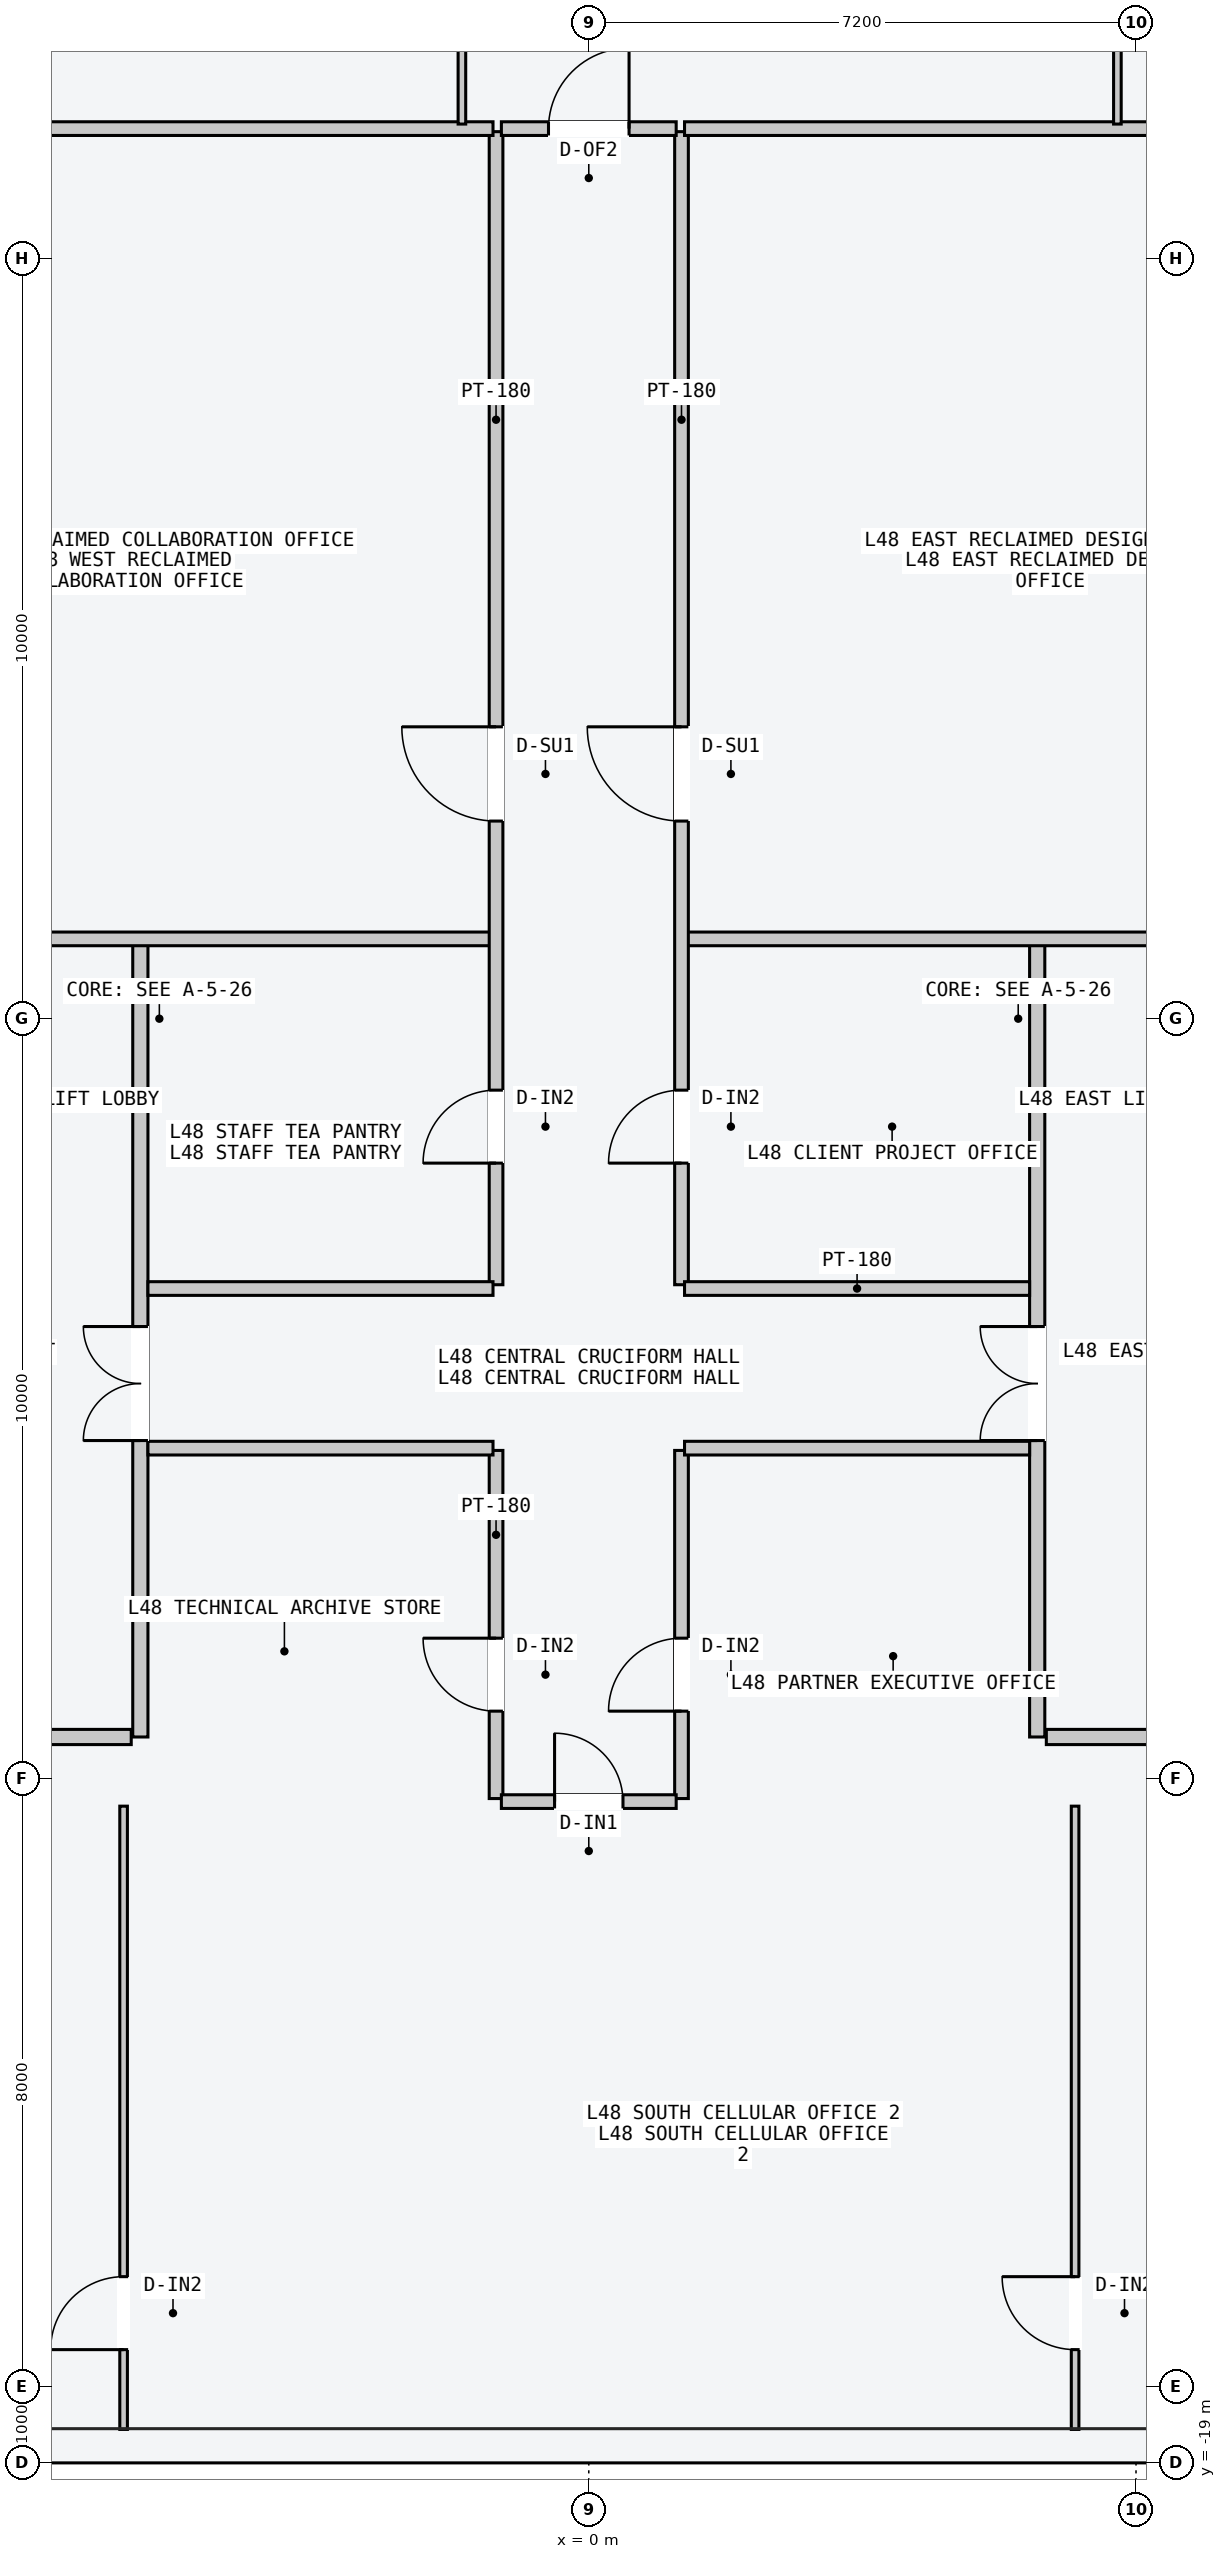
"""IFC4 building model, lengths in metres.
Left out: names, types, materials, properties, quantities, classifications, styles, units other than length and angle.
Written with IfcOpenShell. Run it as: python <this file> out.ifc"""

import sys

from ifc_helpers import new_model, si_unit, direction, frame, frame_2d, origin, place, context, subcontext, project, spatial, rectangle, extrude, element, fill, save


model = new_model("IFC4")
c1 = context("Model", 3, precision=1e-05, world=origin(), true_north=direction((0.0, 1.0)))
c2 = subcontext(c1, "Body", "Model", "MODEL_VIEW")
j1 = project(units=[si_unit("LENGTHUNIT", "METRE"), si_unit("PLANEANGLEUNIT", "RADIAN")], contexts=[c1])
p1 = place(None, origin())
s1 = spatial("IfcSite", under=j1, at=p1, CompositionType="ELEMENT")
p2 = place(p1, origin())
s2 = spatial("IfcBuilding", under=s1, at=p2, CompositionType="ELEMENT")
p3 = place(p2, frame((0.0, 0.0, 183.9)))
s3 = spatial("IfcBuildingStorey", under=s2, at=p3, CompositionType="ELEMENT", Elevation=183.9)
p4 = place(p3, frame((-5.9, -9.45, 0.0), z_axis=(0.0, 0.0, 1.0), x_axis=(0.0, 1.0, 0.0)))
e1 = element("IfcWall", 1, at=p4, inside=s3, PredefinedType="PARTITIONING", context=c2, shape_type="SweptSolid", body=[
    extrude(rectangle(XDim=10.5, YDim=0.2, at=frame_2d((5.25, 0.0))), origin(), (0.0, 0.0, 1.0), 3.4),
])
p5 = place(p4, frame((3.9, 0.0, 0.0)))
e2 = element("IfcOpeningElement", 2, at=p5, cuts=e1, PredefinedType="OPENING", context=c2, shape_type="SweptSolid", body=[
    extrude(rectangle(XDim=1.5, YDim=2.2, at=frame_2d((0.75, 1.1))), frame((0.0, 0.11, 0.0), z_axis=(0.0, -1.0, 0.0), x_axis=(1.0, 0.0, 0.0)), (0.0, 0.0, 1.0), 0.22),
])
p6 = place(p3, frame((-6.02, -9.45, 0.0), z_axis=(0.0, 0.0, 1.0), x_axis=(-1.0, 0.0, 0.0)))
e3 = element("IfcWall", 3, at=p6, inside=s3, PredefinedType="PARTITIONING", context=c2, shape_type="SweptSolid", body=[
    extrude(rectangle(XDim=1.8, YDim=0.2, at=frame_2d((0.9, 0.0))), origin(), (0.0, 0.0, 1.0), 3.4),
])
p7 = place(p3, frame((5.9, -9.45, 0.0), z_axis=(0.0, 0.0, 1.0), x_axis=(0.0, 1.0, 0.0)))
e4 = element("IfcWall", 4, at=p7, inside=s3, PredefinedType="PARTITIONING", context=c2, shape_type="SweptSolid", body=[
    extrude(rectangle(XDim=10.5, YDim=0.2, at=frame_2d((5.25, 0.0))), origin(), (0.0, 0.0, 1.0), 3.4),
])
p8 = place(p7, frame((3.9, 0.0, 0.0)))
e5 = element("IfcOpeningElement", 5, at=p8, cuts=e4, PredefinedType="OPENING", context=c2, shape_type="SweptSolid", body=[
    extrude(rectangle(XDim=1.5, YDim=2.2, at=frame_2d((0.75, 1.1))), frame((0.0, 0.11, 0.0), z_axis=(0.0, -1.0, 0.0), x_axis=(1.0, 0.0, 0.0)), (0.0, 0.0, 1.0), 0.22),
])
p9 = place(p3, frame((6.02, -9.45, 0.0), z_axis=(0.0, 0.0, 1.0), x_axis=(1.0, 0.0, 0.0)))
e6 = element("IfcWall", 6, at=p9, inside=s3, PredefinedType="PARTITIONING", context=c2, shape_type="SweptSolid", body=[
    extrude(rectangle(XDim=1.8, YDim=0.2, at=frame_2d((0.9, 0.0))), origin(), (0.0, 0.0, 1.0), 3.4),
])
p10 = place(p3, frame((-10.05, 1.05, 0.0), z_axis=(0.0, 0.0, 1.0), x_axis=(1.0, 0.0, 0.0)))
e7 = element("IfcWall", 7, at=p10, inside=s3, PredefinedType="PARTITIONING", context=c2, shape_type="SweptSolid", body=[
    extrude(rectangle(XDim=8.79, YDim=0.18, at=frame_2d((4.395, 0.0))), origin(), (0.0, 0.0, 1.0), 3.4),
])
p11 = place(p3, frame((-1.22, -3.5, 0.0), z_axis=(0.0, 0.0, 1.0), x_axis=(0.0, 1.0, 0.0)))
e8 = element("IfcWall", 8, at=p11, inside=s3, PredefinedType="PARTITIONING", context=c2, shape_type="SweptSolid", body=[
    extrude(rectangle(XDim=15.17, YDim=0.18, at=frame_2d((7.585, 0.0))), origin(), (0.0, 0.0, 1.0), 3.4),
])
p12 = place(p11, frame((6.1, 0.0, 0.0)))
e9 = element("IfcOpeningElement", 9, at=p12, cuts=e8, PredefinedType="OPENING", context=c2, shape_type="SweptSolid", body=[
    extrude(rectangle(XDim=1.24, YDim=2.24, at=frame_2d((0.62, 1.12))), frame((0.0, 0.1, 0.0), z_axis=(0.0, -1.0, 0.0), x_axis=(1.0, 0.0, 0.0)), (0.0, 0.0, 1.0), 0.2),
])
p13 = place(p11, frame((1.6, 0.0, 0.0)))
e10 = element("IfcOpeningElement", 10, at=p13, cuts=e8, PredefinedType="OPENING", context=c2, shape_type="SweptSolid", body=[
    extrude(rectangle(XDim=0.96, YDim=2.18, at=frame_2d((0.48, 1.09))), frame((0.0, 0.1, 0.0), z_axis=(0.0, -1.0, 0.0), x_axis=(1.0, 0.0, 0.0)), (0.0, 0.0, 1.0), 0.2),
])
p14 = place(p3, frame((-7.5, 11.71, 0.0), z_axis=(0.0, 0.0, 1.0), x_axis=(1.0, 0.0, 0.0)))
e11 = element("IfcWall", 11, at=p14, inside=s3, PredefinedType="PARTITIONING", context=c2, shape_type="SweptSolid", body=[
    extrude(rectangle(XDim=6.24, YDim=0.18, at=frame_2d((3.12, 0.0))), origin(), (0.0, 0.0, 1.0), 3.4),
])
p15 = place(p3, frame((-5.8, -3.55, 0.0), z_axis=(0.0, 0.0, 1.0), x_axis=(1.0, 0.0, 0.0)))
e12 = element("IfcWall", 12, at=p15, inside=s3, PredefinedType="PARTITIONING", context=c2, shape_type="SweptSolid", body=[
    extrude(rectangle(XDim=4.54, YDim=0.18, at=frame_2d((2.27, 0.0))), origin(), (0.0, 0.0, 1.0), 3.4),
])
p16 = place(p3, frame((1.26, 1.05, 0.0), z_axis=(0.0, 0.0, 1.0), x_axis=(1.0, 0.0, 0.0)))
e13 = element("IfcWall", 13, at=p16, inside=s3, PredefinedType="PARTITIONING", context=c2, shape_type="SweptSolid", body=[
    extrude(rectangle(XDim=8.8, YDim=0.18, at=frame_2d((4.4, 0.0))), origin(), (0.0, 0.0, 1.0), 3.4),
])
p17 = place(p3, frame((1.22, -3.5, 0.0), z_axis=(0.0, 0.0, 1.0), x_axis=(0.0, 1.0, 0.0)))
e14 = element("IfcWall", 14, at=p17, inside=s3, PredefinedType="PARTITIONING", context=c2, shape_type="SweptSolid", body=[
    extrude(rectangle(XDim=15.17, YDim=0.18, at=frame_2d((7.585, 0.0))), origin(), (0.0, 0.0, 1.0), 3.4),
])
p18 = place(p17, frame((6.1, 0.0, 0.0)))
e15 = element("IfcOpeningElement", 15, at=p18, cuts=e14, PredefinedType="OPENING", context=c2, shape_type="SweptSolid", body=[
    extrude(rectangle(XDim=1.24, YDim=2.24, at=frame_2d((0.62, 1.12))), frame((0.0, 0.1, 0.0), z_axis=(0.0, -1.0, 0.0), x_axis=(1.0, 0.0, 0.0)), (0.0, 0.0, 1.0), 0.2),
])
p19 = place(p17, frame((1.6, 0.0, 0.0)))
e16 = element("IfcOpeningElement", 16, at=p19, cuts=e14, PredefinedType="OPENING", context=c2, shape_type="SweptSolid", body=[
    extrude(rectangle(XDim=0.96, YDim=2.18, at=frame_2d((0.48, 1.09))), frame((0.0, 0.1, 0.0), z_axis=(0.0, -1.0, 0.0), x_axis=(1.0, 0.0, 0.0)), (0.0, 0.0, 1.0), 0.2),
])
p20 = place(p3, frame((1.26, 11.71, 0.0), z_axis=(0.0, 0.0, 1.0), x_axis=(1.0, 0.0, 0.0)))
e17 = element("IfcWall", 17, at=p20, inside=s3, PredefinedType="PARTITIONING", context=c2, shape_type="SweptSolid", body=[
    extrude(rectangle(XDim=6.24, YDim=0.18, at=frame_2d((3.12, 0.0))), origin(), (0.0, 0.0, 1.0), 3.4),
])
p21 = place(p3, frame((1.26, -3.55, 0.0), z_axis=(0.0, 0.0, 1.0), x_axis=(1.0, 0.0, 0.0)))
e18 = element("IfcWall", 18, at=p21, inside=s3, PredefinedType="PARTITIONING", context=c2, shape_type="SweptSolid", body=[
    extrude(rectangle(XDim=4.54, YDim=0.18, at=frame_2d((2.27, 0.0))), origin(), (0.0, 0.0, 1.0), 3.4),
])
p22 = place(p3, frame((-1.22, -10.26, 0.0), z_axis=(0.0, 0.0, 1.0), x_axis=(0.0, 1.0, 0.0)))
e19 = element("IfcWall", 19, at=p22, inside=s3, PredefinedType="PARTITIONING", context=c2, shape_type="SweptSolid", body=[
    extrude(rectangle(XDim=4.58, YDim=0.18, at=frame_2d((2.29, 0.0))), origin(), (0.0, 0.0, 1.0), 3.4),
])
p23 = place(p22, frame((1.15, 0.0, 0.0)))
e20 = element("IfcOpeningElement", 20, at=p23, cuts=e19, PredefinedType="OPENING", context=c2, shape_type="SweptSolid", body=[
    extrude(rectangle(XDim=0.96, YDim=2.18, at=frame_2d((0.48, 1.09))), frame((0.0, 0.1, 0.0), z_axis=(0.0, -1.0, 0.0), x_axis=(1.0, 0.0, 0.0)), (0.0, 0.0, 1.0), 0.2),
])
p24 = place(p3, frame((1.22, -10.26, 0.0), z_axis=(0.0, 0.0, 1.0), x_axis=(0.0, 1.0, 0.0)))
e21 = element("IfcWall", 21, at=p24, inside=s3, PredefinedType="PARTITIONING", context=c2, shape_type="SweptSolid", body=[
    extrude(rectangle(XDim=4.58, YDim=0.18, at=frame_2d((2.29, 0.0))), origin(), (0.0, 0.0, 1.0), 3.4),
])
p25 = place(p24, frame((1.15, 0.0, 0.0)))
e22 = element("IfcOpeningElement", 22, at=p25, cuts=e21, PredefinedType="OPENING", context=c2, shape_type="SweptSolid", body=[
    extrude(rectangle(XDim=0.96, YDim=2.18, at=frame_2d((0.48, 1.09))), frame((0.0, 0.1, 0.0), z_axis=(0.0, -1.0, 0.0), x_axis=(1.0, 0.0, 0.0)), (0.0, 0.0, 1.0), 0.2),
])
for number, where, z_axis, x_axis in (
    (23, (-5.8, -5.65, 0.0), (0.0, 0.0, 1.0), (1.0, 0.0, 0.0)),
    (24, (1.26, -5.65, 0.0), (0.0, 0.0, 1.0), (1.0, 0.0, 0.0)),
):
    element("IfcWall", number, at=place(p3, frame(where, z_axis=z_axis, x_axis=x_axis)), inside=s3, PredefinedType="PARTITIONING", context=c2, shape_type="SweptSolid", body=[
        extrude(rectangle(XDim=4.54, YDim=0.18, at=frame_2d((2.27, 0.0))), origin(), (0.0, 0.0, 1.0), 3.4),
    ])
p26 = place(p3, frame((-1.669, 11.77, 0.0), z_axis=(0.0, 0.0, 1.0), x_axis=(0.0, 1.0, 0.0)))
e25 = element("IfcWall", 25, at=p26, inside=s3, PredefinedType="PARTITIONING", context=c2, shape_type="SweptSolid", body=[
    extrude(rectangle(XDim=6.79, YDim=0.1, at=frame_2d((3.395, 0.0))), origin(), (0.0, 0.0, 1.0), 3.4),
])
p27 = place(p26, frame((1.15, 0.0, 0.0)))
e26 = element("IfcOpeningElement", 26, at=p27, cuts=e25, PredefinedType="OPENING", context=c2, shape_type="SweptSolid", body=[
    extrude(rectangle(XDim=0.96, YDim=2.18, at=frame_2d((0.48, 1.09))), frame((0.0, 0.06, 0.0), z_axis=(0.0, -1.0, 0.0), x_axis=(1.0, 0.0, 0.0)), (0.0, 0.0, 1.0), 0.12),
])
p28 = place(p3, frame((6.955, 11.77, 0.0), z_axis=(0.0, 0.0, 1.0), x_axis=(0.0, 1.0, 0.0)))
e27 = element("IfcWall", 27, at=p28, inside=s3, PredefinedType="PARTITIONING", context=c2, shape_type="SweptSolid", body=[
    extrude(rectangle(XDim=6.79, YDim=0.1, at=frame_2d((3.395, 0.0))), origin(), (0.0, 0.0, 1.0), 3.4),
])
p29 = place(p28, frame((1.15, 0.0, 0.0)))
e28 = element("IfcOpeningElement", 28, at=p29, cuts=e27, PredefinedType="OPENING", context=c2, shape_type="SweptSolid", body=[
    extrude(rectangle(XDim=0.96, YDim=2.18, at=frame_2d((0.48, 1.09))), frame((0.0, 0.06, 0.0), z_axis=(0.0, -1.0, 0.0), x_axis=(1.0, 0.0, 0.0)), (0.0, 0.0, 1.0), 0.12),
])
p30 = place(p3, frame((-1.15, 11.71, 0.0), z_axis=(0.0, 0.0, 1.0), x_axis=(1.0, 0.0, 0.0)))
e29 = element("IfcWall", 29, at=p30, inside=s3, PredefinedType="PARTITIONING", context=c2, shape_type="SweptSolid", body=[
    extrude(rectangle(XDim=2.3, YDim=0.18, at=frame_2d((1.15, 0.0))), origin(), (0.0, 0.0, 1.0), 3.4),
])
p31 = place(p30, frame((0.62, 0.0, 0.0)))
e30 = element("IfcOpeningElement", 30, at=p31, cuts=e29, PredefinedType="OPENING", context=c2, shape_type="SweptSolid", body=[
    extrude(rectangle(XDim=1.06, YDim=2.2, at=frame_2d((0.53, 1.1))), frame((0.0, 0.1, 0.0), z_axis=(0.0, -1.0, 0.0), x_axis=(1.0, 0.0, 0.0)), (0.0, 0.0, 1.0), 0.2),
])
p32 = place(p3, frame((-6.12, -18.56, 0.0), z_axis=(0.0, 0.0, 1.0), x_axis=(0.0, 1.0, 0.0)))
e31 = element("IfcWall", 31, at=p32, inside=s3, PredefinedType="PARTITIONING", context=c2, shape_type="SweptSolid", body=[
    extrude(rectangle(XDim=8.2, YDim=0.1, at=frame_2d((4.1, 0.0))), origin(), (0.0, 0.0, 1.0), 3.4),
])
p33 = place(p32, frame((1.05, 0.0, 0.0)))
e32 = element("IfcOpeningElement", 32, at=p33, cuts=e31, PredefinedType="OPENING", context=c2, shape_type="SweptSolid", body=[
    extrude(rectangle(XDim=0.96, YDim=2.18, at=frame_2d((0.48, 1.09))), frame((0.0, 0.06, 0.0), z_axis=(0.0, -1.0, 0.0), x_axis=(1.0, 0.0, 0.0)), (0.0, 0.0, 1.0), 0.12),
])
p34 = place(p3, frame((6.399, -18.56, 0.0), z_axis=(0.0, 0.0, 1.0), x_axis=(0.0, 1.0, 0.0)))
e33 = element("IfcWall", 33, at=p34, inside=s3, PredefinedType="PARTITIONING", context=c2, shape_type="SweptSolid", body=[
    extrude(rectangle(XDim=8.2, YDim=0.1, at=frame_2d((4.1, 0.0))), origin(), (0.0, 0.0, 1.0), 3.4),
])
p35 = place(p34, frame((1.05, 0.0, 0.0)))
e34 = element("IfcOpeningElement", 34, at=p35, cuts=e33, PredefinedType="OPENING", context=c2, shape_type="SweptSolid", body=[
    extrude(rectangle(XDim=0.96, YDim=2.18, at=frame_2d((0.48, 1.09))), frame((0.0, 0.06, 0.0), z_axis=(0.0, -1.0, 0.0), x_axis=(1.0, 0.0, 0.0)), (0.0, 0.0, 1.0), 0.12),
])
p36 = place(p3, frame((-1.15, -10.3, 0.0), z_axis=(0.0, 0.0, 1.0), x_axis=(1.0, 0.0, 0.0)))
e35 = element("IfcWall", 35, at=p36, inside=s3, PredefinedType="PARTITIONING", context=c2, shape_type="SweptSolid", body=[
    extrude(rectangle(XDim=2.3, YDim=0.18, at=frame_2d((1.15, 0.0))), origin(), (0.0, 0.0, 1.0), 3.4),
])
p37 = place(p36, frame((0.7, 0.0, 0.0)))
e36 = element("IfcOpeningElement", 36, at=p37, cuts=e35, PredefinedType="OPENING", context=c2, shape_type="SweptSolid", body=[
    extrude(rectangle(XDim=0.9, YDim=2.15, at=frame_2d((0.45, 1.075))), frame((0.0, 0.1, 0.0), z_axis=(0.0, -1.0, 0.0), x_axis=(1.0, 0.0, 0.0)), (0.0, 0.0, 1.0), 0.2),
])
p38 = place(p5, origin())
e37 = element("IfcDoor", 37, at=p38, inside=s3, OperationType="DOUBLE_DOOR_SINGLE_SWING", PredefinedType="DOOR", context=c2, shape_type="SweptSolid", body=[
    extrude(rectangle(XDim=1.5, YDim=2.2, at=frame_2d((0.75, 1.1))), frame((0.0, 0.025, 0.0), z_axis=(0.0, -1.0, 0.0), x_axis=(1.0, 0.0, 0.0)), (0.0, 0.0, 1.0), 0.05),
])
fill(e2, e37)
p39 = place(p8, origin())
e38 = element("IfcDoor", 38, at=p39, inside=s3, OperationType="DOUBLE_DOOR_SINGLE_SWING", PredefinedType="DOOR", context=c2, shape_type="SweptSolid", body=[
    extrude(rectangle(XDim=1.5, YDim=2.2, at=frame_2d((0.75, 1.1))), frame((0.0, 0.025, 0.0), z_axis=(0.0, -1.0, 0.0), x_axis=(1.0, 0.0, 0.0)), (0.0, 0.0, 1.0), 0.05),
])
fill(e5, e38)
p40 = place(p12, origin())
e39 = element("IfcDoor", 39, at=p40, inside=s3, OperationType="SINGLE_SWING_RIGHT", PredefinedType="DOOR", context=c2, shape_type="SweptSolid", body=[
    extrude(rectangle(XDim=1.24, YDim=2.24, at=frame_2d((0.62, 1.12))), frame((0.0, 0.025, 0.0), z_axis=(0.0, -1.0, 0.0), x_axis=(1.0, 0.0, 0.0)), (0.0, 0.0, 1.0), 0.05),
])
fill(e9, e39)
p41 = place(p13, origin())
e40 = element("IfcDoor", 40, at=p41, inside=s3, OperationType="SINGLE_SWING_LEFT", PredefinedType="DOOR", context=c2, shape_type="SweptSolid", body=[
    extrude(rectangle(XDim=0.96, YDim=2.18, at=frame_2d((0.48, 1.09))), frame((0.0, 0.025, 0.0), z_axis=(0.0, -1.0, 0.0), x_axis=(1.0, 0.0, 0.0)), (0.0, 0.0, 1.0), 0.05),
])
fill(e10, e40)
p42 = place(p18, origin())
e41 = element("IfcDoor", 41, at=p42, inside=s3, OperationType="SINGLE_SWING_RIGHT", PredefinedType="DOOR", context=c2, shape_type="SweptSolid", body=[
    extrude(rectangle(XDim=1.24, YDim=2.24, at=frame_2d((0.62, 1.12))), frame((0.0, 0.025, 0.0), z_axis=(0.0, -1.0, 0.0), x_axis=(1.0, 0.0, 0.0)), (0.0, 0.0, 1.0), 0.05),
])
fill(e15, e41)
p43 = place(p19, origin())
e42 = element("IfcDoor", 42, at=p43, inside=s3, OperationType="SINGLE_SWING_LEFT", PredefinedType="DOOR", context=c2, shape_type="SweptSolid", body=[
    extrude(rectangle(XDim=0.96, YDim=2.18, at=frame_2d((0.48, 1.09))), frame((0.0, 0.025, 0.0), z_axis=(0.0, -1.0, 0.0), x_axis=(1.0, 0.0, 0.0)), (0.0, 0.0, 1.0), 0.05),
])
fill(e16, e42)
p44 = place(p23, origin())
e43 = element("IfcDoor", 43, at=p44, inside=s3, OperationType="SINGLE_SWING_RIGHT", PredefinedType="DOOR", context=c2, shape_type="SweptSolid", body=[
    extrude(rectangle(XDim=0.96, YDim=2.18, at=frame_2d((0.48, 1.09))), frame((0.0, 0.025, 0.0), z_axis=(0.0, -1.0, 0.0), x_axis=(1.0, 0.0, 0.0)), (0.0, 0.0, 1.0), 0.05),
])
fill(e20, e43)
p45 = place(p25, origin())
e44 = element("IfcDoor", 44, at=p45, inside=s3, OperationType="SINGLE_SWING_LEFT", PredefinedType="DOOR", context=c2, shape_type="SweptSolid", body=[
    extrude(rectangle(XDim=0.96, YDim=2.18, at=frame_2d((0.48, 1.09))), frame((0.0, 0.025, 0.0), z_axis=(0.0, -1.0, 0.0), x_axis=(1.0, 0.0, 0.0)), (0.0, 0.0, 1.0), 0.05),
])
fill(e22, e44)
p46 = place(p31, origin())
e45 = element("IfcDoor", 45, at=p46, inside=s3, OperationType="SINGLE_SWING_RIGHT", PredefinedType="DOOR", context=c2, shape_type="SweptSolid", body=[
    extrude(rectangle(XDim=1.06, YDim=2.2, at=frame_2d((0.53, 1.1))), frame((0.0, 0.025, 0.0), z_axis=(0.0, -1.0, 0.0), x_axis=(1.0, 0.0, 0.0)), (0.0, 0.0, 1.0), 0.05),
])
fill(e30, e45)
p47 = place(p33, origin())
e46 = element("IfcDoor", 46, at=p47, inside=s3, OperationType="SINGLE_SWING_LEFT", PredefinedType="DOOR", context=c2, shape_type="SweptSolid", body=[
    extrude(rectangle(XDim=0.96, YDim=2.18, at=frame_2d((0.48, 1.09))), frame((0.0, 0.025, 0.0), z_axis=(0.0, -1.0, 0.0), x_axis=(1.0, 0.0, 0.0)), (0.0, 0.0, 1.0), 0.05),
])
fill(e32, e46)
p48 = place(p35, origin())
e47 = element("IfcDoor", 47, at=p48, inside=s3, OperationType="SINGLE_SWING_RIGHT", PredefinedType="DOOR", context=c2, shape_type="SweptSolid", body=[
    extrude(rectangle(XDim=0.96, YDim=2.18, at=frame_2d((0.48, 1.09))), frame((0.0, 0.025, 0.0), z_axis=(0.0, -1.0, 0.0), x_axis=(1.0, 0.0, 0.0)), (0.0, 0.0, 1.0), 0.05),
])
fill(e34, e47)
p49 = place(p37, origin())
e48 = element("IfcDoor", 48, at=p49, inside=s3, OperationType="SINGLE_SWING_LEFT", PredefinedType="DOOR", context=c2, shape_type="SweptSolid", body=[
    extrude(rectangle(XDim=0.9, YDim=2.15, at=frame_2d((0.45, 1.075))), frame((0.0, 0.025, 0.0), z_axis=(0.0, -1.0, 0.0), x_axis=(1.0, 0.0, 0.0)), (0.0, 0.0, 1.0), 0.05),
])
fill(e36, e48)
save(model, sys.argv[1])
